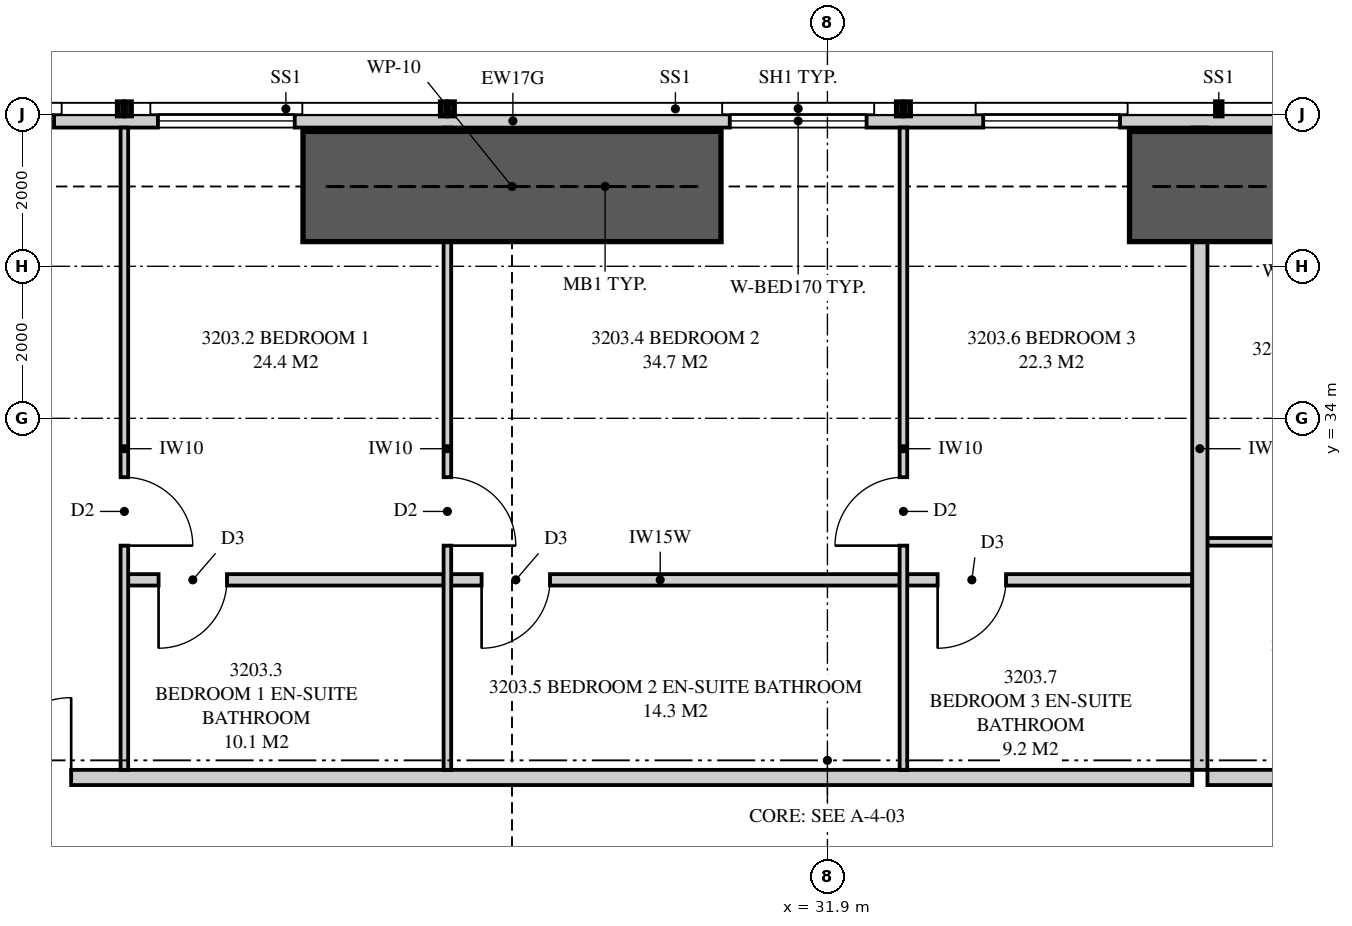
"""IFC4 building model, lengths in metres.
Left out: names, types, materials, properties, quantities, classifications, styles, units other than length and angle.
Written with IfcOpenShell. Run it as: python <this file> out.ifc"""

import sys

from ifc_helpers import new_model, si_unit, direction, frame, frame_2d, origin, place, context, subcontext, project, spatial, polyline, rectangle, outline, extrude, element, fill, save


model = new_model("IFC4")
c1 = context("Model", 3, precision=1e-05, world=origin(), true_north=direction((0.0, 1.0)))
c2 = subcontext(c1, "Body", "Model", "MODEL_VIEW")
j1 = project(units=[si_unit("LENGTHUNIT", "METRE"), si_unit("PLANEANGLEUNIT", "RADIAN")], contexts=[c1])
p1 = place(None, origin())
s1 = spatial("IfcSite", under=j1, at=p1, CompositionType="ELEMENT")
p2 = place(p1, origin())
s2 = spatial("IfcBuilding", under=s1, at=p2, CompositionType="ELEMENT")
p3 = place(p2, frame((0.0, 0.0, 118.25)))
s3 = spatial("IfcBuildingStorey", under=s2, at=p3, CompositionType="ELEMENT", Elevation=118.25)
p4 = place(p3, frame((41.449, 37.913, 0.0), z_axis=(0.0, 0.0, 1.0), x_axis=(-1.0, 0.0, 0.0)))
e1 = element("IfcWall", 1, at=p4, inside=s3, PredefinedType="SOLIDWALL", context=c2, shape_type="SweptSolid", body=[
    extrude(outline(polyline([(0.0, 0.0), (27.374, 0.0), (27.374, 3.11), (24.777, 3.11), (24.777, 2.15), (24.732, 2.15), (24.732, 3.11), (24.574, 3.11), (24.574, 2.15), (2.824, 2.15), (2.824, 3.11), (2.666, 3.11), (2.666, 2.15), (2.62, 2.15), (2.62, 3.11), (0.0, 3.11), (0.0, 0.0)])), frame((0.0, 0.087, 0.0), z_axis=(0.0, -1.0, 0.0), x_axis=(1.0, 0.0, 0.0)), (0.0, 0.0, 1.0), 0.175),
])
p5 = place(p4, frame((5.699, 0.0, 0.4)))
e2 = element("IfcOpeningElement", 2, at=p5, cuts=e1, PredefinedType="OPENING", context=c2, shape_type="SweptSolid", body=[
    extrude(rectangle(XDim=1.8, YDim=1.7, at=frame_2d((0.9, 0.85))), frame((0.0, 0.097, 0.0), z_axis=(0.0, -1.0, 0.0), x_axis=(1.0, 0.0, 0.0)), (0.0, 0.0, 1.0), 0.195),
])
p6 = place(p4, frame((9.034, 0.0, 0.4)))
e3 = element("IfcOpeningElement", 3, at=p6, cuts=e1, PredefinedType="OPENING", context=c2, shape_type="SweptSolid", body=[
    extrude(rectangle(XDim=1.8, YDim=1.7, at=frame_2d((0.9, 0.85))), frame((0.0, 0.097, 0.0), z_axis=(0.0, -1.0, 0.0), x_axis=(1.0, 0.0, 0.0)), (0.0, 0.0, 1.0), 0.195),
])
p7 = place(p4, frame((16.558, 0.0, 0.4)))
e4 = element("IfcOpeningElement", 4, at=p7, cuts=e1, PredefinedType="OPENING", context=c2, shape_type="SweptSolid", body=[
    extrude(rectangle(XDim=1.8, YDim=1.7, at=frame_2d((0.9, 0.85))), frame((0.0, 0.097, 0.0), z_axis=(0.0, -1.0, 0.0), x_axis=(1.0, 0.0, 0.0)), (0.0, 0.0, 1.0), 0.195),
])
p8 = place(p4, frame((19.724, 0.0, 0.4)))
e5 = element("IfcOpeningElement", 5, at=p8, cuts=e1, PredefinedType="OPENING", context=c2, shape_type="SweptSolid", body=[
    extrude(rectangle(XDim=1.8, YDim=1.7, at=frame_2d((0.9, 0.85))), frame((0.0, 0.097, 0.0), z_axis=(0.0, -1.0, 0.0), x_axis=(1.0, 0.0, 0.0)), (0.0, 0.0, 1.0), 0.195),
])
p9 = place(p3, frame((36.8, 37.825, 0.0), z_axis=(0.0, 0.0, 1.0), x_axis=(0.0, -1.0, 0.0)))
e6 = element("IfcWall", 6, at=p9, inside=s3, PredefinedType="PARTITIONING", context=c2, shape_type="SweptSolid", body=[
    extrude(outline(polyline([(0.529, 2.15), (0.0, 2.15), (0.0, 0.0), (0.529, 0.0), (0.529, 0.256), (1.021, 0.256), (1.021, 0.0), (8.45, 0.0), (8.45, 3.11), (1.685, 3.11), (1.685, 2.15), (1.021, 2.15), (1.021, 1.894), (0.529, 1.894), (0.529, 2.15)])), frame((0.0, 0.1, 0.0), z_axis=(0.0, -1.0, 0.0), x_axis=(1.0, 0.0, 0.0)), (0.0, 0.0, 1.0), 0.2),
])
p10 = place(p3, frame((17.775, 29.275, 0.0), z_axis=(0.0, 0.0, 1.0), x_axis=(1.0, 0.0, 0.0)))
e7 = element("IfcWall", 7, at=p10, inside=s3, PredefinedType="PARTITIONING", context=c2, shape_type="SweptSolid", body=[
    extrude(outline(polyline([(0.0, 0.0), (18.925, 0.0), (18.925, 3.11), (10.312, 3.11), (10.312, 2.541), (9.638, 2.541), (9.638, 3.11), (0.0, 3.11), (0.0, 0.0)])), frame((0.0, 0.1, 0.0), z_axis=(0.0, -1.0, 0.0), x_axis=(1.0, 0.0, 0.0)), (0.0, 0.0, 1.0), 0.2),
])
p11 = place(p10, frame((3.125, 0.0, 0.0)))
e8 = element("IfcOpeningElement", 8, at=p11, cuts=e7, PredefinedType="OPENING", context=c2, shape_type="SweptSolid", body=[
    extrude(rectangle(XDim=1.05, YDim=2.2, at=frame_2d((0.525, 1.1))), frame((0.0, 0.11, 0.0), z_axis=(0.0, -1.0, 0.0), x_axis=(1.0, 0.0, 0.0)), (0.0, 0.0, 1.0), 0.22),
])
p12 = place(p3, frame((22.65, 37.825, 0.0), z_axis=(0.0, 0.0, 1.0), x_axis=(0.0, -1.0, 0.0)))
e9 = element("IfcWall", 9, at=p12, inside=s3, PredefinedType="PARTITIONING", context=c2, shape_type="SweptSolid", body=[
    extrude(outline(polyline([(0.0, 0.0), (8.45, 0.0), (8.45, 3.11), (1.635, 3.11), (1.635, 2.15), (0.0, 2.15), (0.0, 3.11), (0.0, 0.0)])), frame((0.0, 0.05, 0.0), z_axis=(0.0, -1.0, 0.0), x_axis=(1.0, 0.0, 0.0)), (0.0, 0.0, 1.0), 0.1),
])
p13 = place(p12, frame((4.6, 0.0, 0.0)))
e10 = element("IfcOpeningElement", 10, at=p13, cuts=e9, PredefinedType="OPENING", context=c2, shape_type="SweptSolid", body=[
    extrude(rectangle(XDim=0.9, YDim=2.1, at=frame_2d((0.45, 1.05))), frame((0.0, 0.06, 0.0), z_axis=(0.0, -1.0, 0.0), x_axis=(1.0, 0.0, 0.0)), (0.0, 0.0, 1.0), 0.12),
])
p14 = place(p3, frame((26.9, 37.825, 0.0), z_axis=(0.0, 0.0, 1.0), x_axis=(0.0, -1.0, 0.0)))
e11 = element("IfcWall", 11, at=p14, inside=s3, PredefinedType="PARTITIONING", context=c2, shape_type="SweptSolid", body=[
    extrude(outline(polyline([(0.529, 2.15), (0.0, 2.15), (0.0, 0.0), (0.529, 0.0), (0.529, 0.889), (1.021, 0.889), (1.021, 0.0), (8.45, 0.0), (8.45, 3.11), (1.635, 3.11), (1.635, 2.15), (1.021, 2.15), (1.021, 1.261), (0.529, 1.261), (0.529, 2.15)])), frame((0.0, 0.05, 0.0), z_axis=(0.0, -1.0, 0.0), x_axis=(1.0, 0.0, 0.0)), (0.0, 0.0, 1.0), 0.1),
])
p15 = place(p14, frame((4.6, 0.0, 0.0)))
e12 = element("IfcOpeningElement", 12, at=p15, cuts=e11, PredefinedType="OPENING", context=c2, shape_type="SweptSolid", body=[
    extrude(rectangle(XDim=0.9, YDim=2.1, at=frame_2d((0.45, 1.05))), frame((0.0, 0.06, 0.0), z_axis=(0.0, -1.0, 0.0), x_axis=(1.0, 0.0, 0.0)), (0.0, 0.0, 1.0), 0.12),
])
p16 = place(p3, frame((32.9, 37.825, 0.0), z_axis=(0.0, 0.0, 1.0), x_axis=(0.0, -1.0, 0.0)))
e13 = element("IfcWall", 13, at=p16, inside=s3, PredefinedType="PARTITIONING", context=c2, shape_type="SweptSolid", body=[
    extrude(outline(polyline([(0.0, 0.0), (8.45, 0.0), (8.45, 3.11), (1.635, 3.11), (1.635, 2.15), (0.0, 2.15), (0.0, 3.11), (0.0, 0.0)])), frame((0.0, 0.05, 0.0), z_axis=(0.0, -1.0, 0.0), x_axis=(1.0, 0.0, 0.0)), (0.0, 0.0, 1.0), 0.1),
])
p17 = place(p16, frame((4.6, 0.0, 0.0)))
e14 = element("IfcOpeningElement", 14, at=p17, cuts=e13, PredefinedType="OPENING", context=c2, shape_type="SweptSolid", body=[
    extrude(rectangle(XDim=0.9, YDim=2.1, at=frame_2d((0.45, 1.05))), frame((0.0, 0.06, 0.0), z_axis=(0.0, -1.0, 0.0), x_axis=(1.0, 0.0, 0.0)), (0.0, 0.0, 1.0), 0.12),
])
p18 = place(p3, frame((22.7, 31.875, 0.0), z_axis=(0.0, 0.0, 1.0), x_axis=(1.0, 0.0, 0.0)))
e15 = element("IfcWall", 15, at=p18, inside=s3, PredefinedType="PLUMBINGWALL", context=c2, shape_type="SweptSolid", body=[
    extrude(rectangle(XDim=4.15, YDim=0.15, at=frame_2d((2.075, 0.0))), origin(), (0.0, 0.0, 1.0), 3.11),
])
p19 = place(p18, frame((0.4, 0.0, 0.0)))
e16 = element("IfcOpeningElement", 16, at=p19, cuts=e15, PredefinedType="OPENING", context=c2, shape_type="SweptSolid", body=[
    extrude(rectangle(XDim=0.9, YDim=2.1, at=frame_2d((0.45, 1.05))), frame((0.0, 0.085, 0.0), z_axis=(0.0, -1.0, 0.0), x_axis=(1.0, 0.0, 0.0)), (0.0, 0.0, 1.0), 0.17),
])
p20 = place(p3, frame((26.95, 31.875, 0.0), z_axis=(0.0, 0.0, 1.0), x_axis=(1.0, 0.0, 0.0)))
e17 = element("IfcWall", 17, at=p20, inside=s3, PredefinedType="PLUMBINGWALL", context=c2, shape_type="SweptSolid", body=[
    extrude(outline(polyline([(0.0, 0.0), (5.9, 0.0), (5.9, 3.11), (1.112, 3.11), (1.112, 2.541), (0.488, 2.541), (0.488, 3.11), (0.0, 3.11), (0.0, 0.0)])), frame((0.0, 0.075, 0.0), z_axis=(0.0, -1.0, 0.0), x_axis=(1.0, 0.0, 0.0)), (0.0, 0.0, 1.0), 0.15),
])
p21 = place(p20, frame((0.4, 0.0, 0.0)))
e18 = element("IfcOpeningElement", 18, at=p21, cuts=e17, PredefinedType="OPENING", context=c2, shape_type="SweptSolid", body=[
    extrude(rectangle(XDim=0.9, YDim=2.1, at=frame_2d((0.45, 1.05))), frame((0.0, 0.085, 0.0), z_axis=(0.0, -1.0, 0.0), x_axis=(1.0, 0.0, 0.0)), (0.0, 0.0, 1.0), 0.17),
])
p22 = place(p3, frame((32.95, 31.875, 0.0), z_axis=(0.0, 0.0, 1.0), x_axis=(1.0, 0.0, 0.0)))
e19 = element("IfcWall", 19, at=p22, inside=s3, PredefinedType="PLUMBINGWALL", context=c2, shape_type="SweptSolid", body=[
    extrude(rectangle(XDim=3.75, YDim=0.15, at=frame_2d((1.875, 0.0))), origin(), (0.0, 0.0, 1.0), 3.11),
])
p23 = place(p22, frame((0.4, 0.0, 0.0)))
e20 = element("IfcOpeningElement", 20, at=p23, cuts=e19, PredefinedType="OPENING", context=c2, shape_type="SweptSolid", body=[
    extrude(rectangle(XDim=0.9, YDim=2.1, at=frame_2d((0.45, 1.05))), frame((0.0, 0.085, 0.0), z_axis=(0.0, -1.0, 0.0), x_axis=(1.0, 0.0, 0.0)), (0.0, 0.0, 1.0), 0.17),
])
p24 = place(p3, frame((36.9, 29.275, 0.0), z_axis=(0.0, 0.0, 1.0), x_axis=(1.0, 0.0, 0.0)))
e21 = element("IfcWall", 21, at=p24, inside=s3, PredefinedType="PARTITIONING", context=c2, shape_type="SweptSolid", body=[
    extrude(outline(polyline([(0.0, 0.0), (9.125, 0.0), (9.125, 3.11), (2.062, 3.11), (2.062, 2.541), (1.388, 2.541), (1.388, 3.11), (0.0, 3.11), (0.0, 0.0)])), frame((0.0, 0.1, 0.0), z_axis=(0.0, -1.0, 0.0), x_axis=(1.0, 0.0, 0.0)), (0.0, 0.0, 1.0), 0.2),
])
p25 = place(p24, frame((4.3, 0.0, 0.0)))
e22 = element("IfcOpeningElement", 22, at=p25, cuts=e21, PredefinedType="OPENING", context=c2, shape_type="SweptSolid", body=[
    extrude(rectangle(XDim=1.05, YDim=2.2, at=frame_2d((0.525, 1.1))), frame((0.0, 0.11, 0.0), z_axis=(0.0, -1.0, 0.0), x_axis=(1.0, 0.0, 0.0)), (0.0, 0.0, 1.0), 0.22),
])
p26 = place(p3, frame((36.9, 32.375, 0.0), z_axis=(0.0, 0.0, 1.0), x_axis=(1.0, 0.0, 0.0)))
e23 = element("IfcWall", 23, at=p26, inside=s3, PredefinedType="PARTITIONING", context=c2, shape_type="SweptSolid", body=[
    extrude(outline(polyline([(0.0, 0.0), (3.55, 0.0), (3.55, 3.11), (2.012, 3.11), (2.012, 2.541), (1.438, 2.541), (1.438, 3.11), (0.0, 3.11), (0.0, 0.0)])), frame((0.0, 0.05, 0.0), z_axis=(0.0, -1.0, 0.0), x_axis=(1.0, 0.0, 0.0)), (0.0, 0.0, 1.0), 0.1),
])
p27 = place(p26, frame((1.35, 0.0, 0.0)))
e24 = element("IfcOpeningElement", 24, at=p27, cuts=e23, PredefinedType="OPENING", context=c2, shape_type="SweptSolid", body=[
    extrude(rectangle(XDim=0.9, YDim=2.1, at=frame_2d((0.45, 1.05))), frame((0.0, 0.06, 0.0), z_axis=(0.0, -1.0, 0.0), x_axis=(1.0, 0.0, 0.0)), (0.0, 0.0, 1.0), 0.12),
])
for number, where, z_axis, x_axis in (
    (25, (35.875, 37.05, 0.0), (0.0, 0.0, 1.0), (1.0, 0.0, 0.0)),
    (26, (25.0, 37.05, 0.0), (0.0, 0.0, 1.0), (1.0, 0.0, 0.0)),
):
    element("IfcWall", number, at=place(p3, frame(where, z_axis=z_axis, x_axis=x_axis)), inside=s3, PredefinedType="SHEAR", context=c2, shape_type="SweptSolid", body=[
        extrude(rectangle(XDim=5.5, YDim=1.45, at=frame_2d((2.75, 0.0))), origin(), (0.0, 0.0, 1.0), 3.35),
    ])
p28 = place(p5, origin())
e27 = element("IfcWindow", 27, at=p28, inside=s3, PartitioningType="SINGLE_PANEL", PredefinedType="WINDOW", context=c2, shape_type="SweptSolid", body=[
    extrude(rectangle(XDim=1.8, YDim=1.7, at=frame_2d((0.9, 0.85))), frame((0.0, 0.03, 0.0), z_axis=(0.0, -1.0, 0.0), x_axis=(1.0, 0.0, 0.0)), (0.0, 0.0, 1.0), 0.06),
])
fill(e2, e27)
p29 = place(p6, origin())
e28 = element("IfcWindow", 28, at=p29, inside=s3, PartitioningType="SINGLE_PANEL", PredefinedType="WINDOW", context=c2, shape_type="SweptSolid", body=[
    extrude(rectangle(XDim=1.8, YDim=1.7, at=frame_2d((0.9, 0.85))), frame((0.0, 0.03, 0.0), z_axis=(0.0, -1.0, 0.0), x_axis=(1.0, 0.0, 0.0)), (0.0, 0.0, 1.0), 0.06),
])
fill(e3, e28)
p30 = place(p7, origin())
e29 = element("IfcWindow", 29, at=p30, inside=s3, PartitioningType="SINGLE_PANEL", PredefinedType="WINDOW", context=c2, shape_type="SweptSolid", body=[
    extrude(rectangle(XDim=1.8, YDim=1.7, at=frame_2d((0.9, 0.85))), frame((0.0, 0.03, 0.0), z_axis=(0.0, -1.0, 0.0), x_axis=(1.0, 0.0, 0.0)), (0.0, 0.0, 1.0), 0.06),
])
fill(e4, e29)
p31 = place(p8, origin())
e30 = element("IfcWindow", 30, at=p31, inside=s3, PartitioningType="SINGLE_PANEL", PredefinedType="WINDOW", context=c2, shape_type="SweptSolid", body=[
    extrude(rectangle(XDim=1.8, YDim=1.7, at=frame_2d((0.9, 0.85))), frame((0.0, 0.03, 0.0), z_axis=(0.0, -1.0, 0.0), x_axis=(1.0, 0.0, 0.0)), (0.0, 0.0, 1.0), 0.06),
])
fill(e5, e30)
p32 = place(p11, origin())
e31 = element("IfcDoor", 31, at=p32, inside=s3, OperationType="SINGLE_SWING_RIGHT", PredefinedType="DOOR", context=c2, shape_type="SweptSolid", body=[
    extrude(rectangle(XDim=1.05, YDim=2.2, at=frame_2d((0.525, 1.1))), frame((0.0, 0.025, 0.0), z_axis=(0.0, -1.0, 0.0), x_axis=(1.0, 0.0, 0.0)), (0.0, 0.0, 1.0), 0.05),
])
fill(e8, e31)
p33 = place(p13, origin())
e32 = element("IfcDoor", 32, at=p33, inside=s3, OperationType="SINGLE_SWING_RIGHT", PredefinedType="DOOR", context=c2, shape_type="SweptSolid", body=[
    extrude(rectangle(XDim=0.9, YDim=2.1, at=frame_2d((0.45, 1.05))), frame((0.0, 0.025, 0.0), z_axis=(0.0, -1.0, 0.0), x_axis=(1.0, 0.0, 0.0)), (0.0, 0.0, 1.0), 0.05),
])
fill(e10, e32)
p34 = place(p19, frame((0.9, 0.0, 0.0), z_axis=(0.0, 0.0, 1.0), x_axis=(-1.0, 0.0, 0.0)))
e33 = element("IfcDoor", 33, at=p34, inside=s3, OperationType="SINGLE_SWING_RIGHT", PredefinedType="DOOR", context=c2, shape_type="SweptSolid", body=[
    extrude(rectangle(XDim=0.9, YDim=2.1, at=frame_2d((0.45, 1.05))), frame((0.0, 0.025, 0.0), z_axis=(0.0, -1.0, 0.0), x_axis=(1.0, 0.0, 0.0)), (0.0, 0.0, 1.0), 0.05),
])
fill(e16, e33)
p35 = place(p15, origin())
e34 = element("IfcDoor", 34, at=p35, inside=s3, OperationType="SINGLE_SWING_RIGHT", PredefinedType="DOOR", context=c2, shape_type="SweptSolid", body=[
    extrude(rectangle(XDim=0.9, YDim=2.1, at=frame_2d((0.45, 1.05))), frame((0.0, 0.025, 0.0), z_axis=(0.0, -1.0, 0.0), x_axis=(1.0, 0.0, 0.0)), (0.0, 0.0, 1.0), 0.05),
])
fill(e12, e34)
p36 = place(p21, frame((0.9, 0.0, 0.0), z_axis=(0.0, 0.0, 1.0), x_axis=(-1.0, 0.0, 0.0)))
e35 = element("IfcDoor", 35, at=p36, inside=s3, OperationType="SINGLE_SWING_RIGHT", PredefinedType="DOOR", context=c2, shape_type="SweptSolid", body=[
    extrude(rectangle(XDim=0.9, YDim=2.1, at=frame_2d((0.45, 1.05))), frame((0.0, 0.025, 0.0), z_axis=(0.0, -1.0, 0.0), x_axis=(1.0, 0.0, 0.0)), (0.0, 0.0, 1.0), 0.05),
])
fill(e18, e35)
p37 = place(p17, frame((0.9, 0.0, 0.0), z_axis=(0.0, 0.0, 1.0), x_axis=(-1.0, 0.0, 0.0)))
e36 = element("IfcDoor", 36, at=p37, inside=s3, OperationType="SINGLE_SWING_LEFT", PredefinedType="DOOR", context=c2, shape_type="SweptSolid", body=[
    extrude(rectangle(XDim=0.9, YDim=2.1, at=frame_2d((0.45, 1.05))), frame((0.0, 0.025, 0.0), z_axis=(0.0, -1.0, 0.0), x_axis=(1.0, 0.0, 0.0)), (0.0, 0.0, 1.0), 0.05),
])
fill(e14, e36)
p38 = place(p23, frame((0.9, 0.0, 0.0), z_axis=(0.0, 0.0, 1.0), x_axis=(-1.0, 0.0, 0.0)))
e37 = element("IfcDoor", 37, at=p38, inside=s3, OperationType="SINGLE_SWING_RIGHT", PredefinedType="DOOR", context=c2, shape_type="SweptSolid", body=[
    extrude(rectangle(XDim=0.9, YDim=2.1, at=frame_2d((0.45, 1.05))), frame((0.0, 0.025, 0.0), z_axis=(0.0, -1.0, 0.0), x_axis=(1.0, 0.0, 0.0)), (0.0, 0.0, 1.0), 0.05),
])
fill(e20, e37)
save(model, sys.argv[1])
